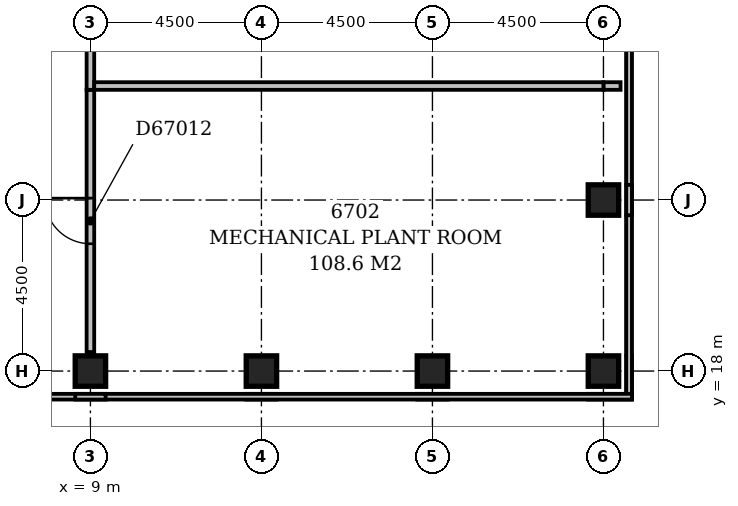
"""IFC4 building model, lengths in metres.
Left out: names, types, materials, properties, quantities, classifications, styles, units other than length and angle.
Written with IfcOpenShell. Run it as: python <this file> out.ifc"""

import sys

from ifc_helpers import new_model, si_unit, direction, frame, frame_2d, origin, origin_2d, place, context, subcontext, project, spatial, rectangle, extrude, element, fill, save


model = new_model("IFC4")
c1 = context("Model", 3, precision=1e-05, world=origin(), true_north=direction((0.0, 1.0)))
c2 = subcontext(c1, "Body", "Model", "MODEL_VIEW")
j1 = project(units=[si_unit("LENGTHUNIT", "METRE"), si_unit("PLANEANGLEUNIT", "RADIAN")], contexts=[c1])
p1 = place(None, origin())
s1 = spatial("IfcSite", under=j1, at=p1, CompositionType="ELEMENT")
p2 = place(p1, origin())
s2 = spatial("IfcBuilding", under=s1, at=p2, CompositionType="ELEMENT")
p3 = place(p2, frame((0.0, 0.0, 258.2)))
s3 = spatial("IfcBuildingStorey", under=s2, at=p3, CompositionType="ELEMENT", Elevation=258.2)
for number, where, z_axis, x_axis in (
    (1, (9.0, 18.0, -0.45), (0.0, 0.0, 1.0), (1.0, 0.0, 0.0)),
    (2, (13.5, 18.0, -0.45), (0.0, 0.0, 1.0), (1.0, 0.0, 0.0)),
    (3, (18.0, 18.0, -0.45), (0.0, 0.0, 1.0), (1.0, 0.0, 0.0)),
    (4, (22.5, 18.0, -0.45), (0.0, 0.0, 1.0), (1.0, 0.0, 0.0)),
    (5, (22.5, 22.5, -0.45), (0.0, 0.0, 1.0), (1.0, 0.0, 0.0)),
):
    element("IfcColumn", number, at=place(p3, frame(where, z_axis=z_axis, x_axis=x_axis)), inside=s3, PredefinedType="COLUMN", context=c2, shape_type="SweptSolid", body=[
        extrude(rectangle(XDim=0.8, YDim=0.8, at=origin_2d()), origin(), (0.0, 0.0, 1.0), 8.05),
    ])
p4 = place(p3, frame((3.9, 17.325, 0.0), z_axis=(0.0, 0.0, 1.0), x_axis=(1.0, 0.0, 0.0)))
e6 = element("IfcWall", 6, at=p4, inside=s3, PredefinedType="STANDARD", context=c2, shape_type="SweptSolid", body=[
    extrude(rectangle(XDim=19.35, YDim=0.15, at=frame_2d((9.675, 0.0))), origin(), (0.0, 0.0, 1.0), 1.1),
])
p5 = place(p3, frame((23.175, 17.4, 0.0), z_axis=(0.0, 0.0, 1.0), x_axis=(0.0, 1.0, 0.0)))
e7 = element("IfcWall", 7, at=p5, inside=s3, PredefinedType="STANDARD", context=c2, shape_type="SweptSolid", body=[
    extrude(rectangle(XDim=17.85, YDim=0.15, at=frame_2d((8.925, 0.0))), origin(), (0.0, 0.0, 1.0), 1.1),
])
for number, where, z_axis, x_axis in (
    (8, (8.6, 17.325, 1.1), (0.0, 0.0, 1.0), (1.0, 0.0, 0.0)),
    (9, (13.1, 17.325, 1.1), (0.0, 0.0, 1.0), (1.0, 0.0, 0.0)),
    (10, (17.6, 17.325, 1.1), (0.0, 0.0, 1.0), (1.0, 0.0, 0.0)),
):
    element("IfcWall", number, at=place(p3, frame(where, z_axis=z_axis, x_axis=x_axis)), inside=s3, PredefinedType="STANDARD", context=c2, shape_type="SweptSolid", body=[
        extrude(rectangle(XDim=0.8, YDim=0.15, at=frame_2d((0.4, 0.0))), origin(), (0.0, 0.0, 1.0), 6.0),
    ])
p6 = place(p3, frame((22.1, 17.325, 1.1), z_axis=(0.0, 0.0, 1.0), x_axis=(1.0, 0.0, 0.0)))
e11 = element("IfcWall", 11, at=p6, inside=s3, PredefinedType="STANDARD", context=c2, shape_type="SweptSolid", body=[
    extrude(rectangle(XDim=1.15, YDim=0.15, at=frame_2d((0.575, 0.0))), origin(), (0.0, 0.0, 1.0), 6.0),
])
p7 = place(p3, frame((23.175, 17.4, 1.1), z_axis=(0.0, 0.0, 1.0), x_axis=(0.0, 1.0, 0.0)))
e12 = element("IfcWall", 12, at=p7, inside=s3, PredefinedType="STANDARD", context=c2, shape_type="SweptSolid", body=[
    extrude(rectangle(XDim=1.0, YDim=0.15, at=frame_2d((0.5, 0.0))), origin(), (0.0, 0.0, 1.0), 6.0),
])
p8 = place(p3, frame((23.175, 22.1, 1.1), z_axis=(0.0, 0.0, 1.0), x_axis=(0.0, 1.0, 0.0)))
e13 = element("IfcWall", 13, at=p8, inside=s3, PredefinedType="STANDARD", context=c2, shape_type="SweptSolid", body=[
    extrude(rectangle(XDim=0.8, YDim=0.15, at=frame_2d((0.4, 0.0))), origin(), (0.0, 0.0, 1.0), 6.0),
])
p9 = place(p3, frame((9.0, 18.5, 0.0), z_axis=(0.0, 0.0, 1.0), x_axis=(0.0, 1.0, 0.0)))
e14 = element("IfcWall", 14, at=p9, inside=s3, PredefinedType="PARTITIONING", context=c2, shape_type="SweptSolid", body=[
    extrude(rectangle(XDim=6.9, YDim=0.2, at=frame_2d((3.45, 0.0))), origin(), (0.0, 0.0, 1.0), 7.6),
])
p10 = place(p9, frame((2.85, 0.0, 0.0)))
e15 = element("IfcOpeningElement", 15, at=p10, cuts=e14, PredefinedType="OPENING", context=c2, shape_type="SweptSolid", body=[
    extrude(rectangle(XDim=1.2, YDim=2.1, at=frame_2d((0.6, 1.05))), frame((0.0, 0.112, 0.0), z_axis=(0.0, -1.0, 0.0), x_axis=(1.0, 0.0, 0.0)), (0.0, 0.0, 1.0), 0.224),
])
p11 = place(p3, frame((9.1, 25.5, 0.0), z_axis=(0.0, 0.0, 1.0), x_axis=(1.0, 0.0, 0.0)))
e16 = element("IfcWall", 16, at=p11, inside=s3, PredefinedType="PARTITIONING", context=c2, shape_type="SweptSolid", body=[
    extrude(rectangle(XDim=13.4, YDim=0.2, at=frame_2d((6.7, 0.0))), origin(), (0.0, 0.0, 1.0), 7.6),
])
p12 = place(p3, frame((9.0, 25.4, 0.0), z_axis=(0.0, 0.0, 1.0), x_axis=(0.0, 1.0, 0.0)))
e17 = element("IfcWall", 17, at=p12, inside=s3, PredefinedType="PARTITIONING", context=c2, shape_type="SweptSolid", body=[
    extrude(rectangle(XDim=5.5, YDim=0.2, at=frame_2d((2.75, 0.0))), origin(), (0.0, 0.0, 1.0), 7.6),
])
p13 = place(p12, frame((2.25, 0.0, 0.0)))
e18 = element("IfcOpeningElement", 18, at=p13, cuts=e17, PredefinedType="OPENING", context=c2, shape_type="SweptSolid", body=[
    extrude(rectangle(XDim=1.2, YDim=2.1, at=frame_2d((0.6, 1.05))), frame((0.0, 0.112, 0.0), z_axis=(0.0, -1.0, 0.0), x_axis=(1.0, 0.0, 0.0)), (0.0, 0.0, 1.0), 0.224),
])
p14 = place(p3, frame((22.5, 25.5, 0.0), z_axis=(0.0, 0.0, 1.0), x_axis=(1.0, 0.0, 0.0)))
e19 = element("IfcWall", 19, at=p14, inside=s3, PredefinedType="PARTITIONING", context=c2, shape_type="SweptSolid", body=[
    extrude(rectangle(XDim=0.45, YDim=0.2, at=frame_2d((0.225, 0.0))), origin(), (0.0, 0.0, 1.0), 7.6),
])
p15 = place(p10, frame((1.2, 0.0, 0.0), z_axis=(0.0, 0.0, 1.0), x_axis=(-1.0, 0.0, 0.0)))
e20 = element("IfcDoor", 20, at=p15, inside=s3, OperationType="SINGLE_SWING_LEFT", PredefinedType="DOOR", context=c2, shape_type="SweptSolid", body=[
    extrude(rectangle(XDim=1.2, YDim=2.1, at=frame_2d((0.6, 1.05))), frame((0.0, 0.025, 0.0), z_axis=(0.0, -1.0, 0.0), x_axis=(1.0, 0.0, 0.0)), (0.0, 0.0, 1.0), 0.05),
])
fill(e15, e20)
save(model, sys.argv[1])
